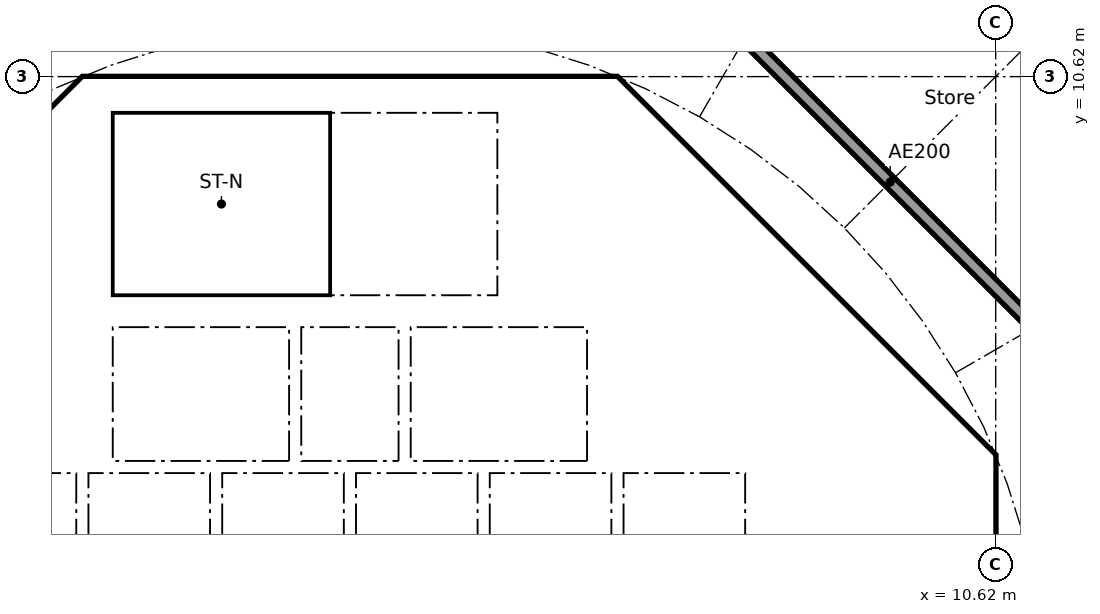
"""IFC4 building model, lengths in metres.
Left out: names, types, materials, properties, quantities, classifications, styles, units other than length and angle.
Written with IfcOpenShell. Run it as: python <this file> out.ifc"""

import sys

from ifc_helpers import new_model, si_unit, direction, frame, frame_2d, origin, place, context, subcontext, project, spatial, polyline, rectangle, outline, extrude, element, fill, save


model = new_model("IFC4")
c1 = context("Model", 3, precision=1e-05, world=origin(), true_north=direction((0.0, 1.0)))
c2 = subcontext(c1, "Body", "Model", "MODEL_VIEW")
j1 = project(units=[si_unit("LENGTHUNIT", "METRE"), si_unit("PLANEANGLEUNIT", "RADIAN")], contexts=[c1])
p1 = place(None, origin())
s1 = spatial("IfcSite", under=j1, at=p1, CompositionType="ELEMENT")
p2 = place(p1, origin())
s2 = spatial("IfcBuilding", under=s1, at=p2, CompositionType="ELEMENT")
p3 = place(p2, frame((0.0, 0.0, 130.7)))
s3 = spatial("IfcBuildingStorey", under=s2, at=p3, CompositionType="ELEMENT", Elevation=130.7)
p4 = place(p3, frame((9.988, 4.613, 0.0), z_axis=(0.0, 0.0, 1.0), x_axis=(-0.707106781187, 0.707106781187, 0.0)))
e1 = element("IfcWall", 1, at=p4, inside=s3, PredefinedType="SHEAR", context=c2, shape_type="SweptSolid", body=[
    extrude(rectangle(XDim=7.602, YDim=0.6, at=frame_2d((3.801, 0.0))), origin(), (0.0, 0.0, 1.0), 3.44),
])
p5 = place(p4, frame((3.201, 0.0, 0.0)))
e2 = element("IfcOpeningElement", 2, at=p5, cuts=e1, PredefinedType="OPENING", context=c2, shape_type="SweptSolid", body=[
    extrude(rectangle(XDim=1.2, YDim=2.1, at=frame_2d((0.6, 1.05))), frame((0.0, 0.31, 0.0), z_axis=(0.0, -1.0, 0.0), x_axis=(1.0, 0.0, 0.0)), (0.0, 0.0, 1.0), 0.62),
])
p6 = place(p3, frame((-4.613, 9.988, 0.0), z_axis=(0.0, 0.0, 1.0), x_axis=(-0.707106781187, -0.707106781187, 0.0)))
e3 = element("IfcWall", 3, at=p6, inside=s3, PredefinedType="SHEAR", context=c2, shape_type="SweptSolid", body=[
    extrude(rectangle(XDim=7.602, YDim=0.6, at=frame_2d((3.801, 0.0))), origin(), (0.0, 0.0, 1.0), 3.44),
])
p7 = place(p6, frame((0.351, 0.0, 0.0)))
e4 = element("IfcOpeningElement", 4, at=p7, cuts=e3, PredefinedType="OPENING", context=c2, shape_type="SweptSolid", body=[
    extrude(rectangle(XDim=1.1, YDim=2.1, at=frame_2d((0.55, 1.05))), frame((0.0, 0.31, 0.0), z_axis=(0.0, -1.0, 0.0), x_axis=(1.0, 0.0, 0.0)), (0.0, 0.0, 1.0), 0.62),
])
p8 = place(p3, frame((4.0, 4.3, 0.0), z_axis=(0.0, 0.0, 1.0), x_axis=(0.0, 1.0, 0.0)))
e5 = element("IfcWall", 5, at=p8, inside=s3, PredefinedType="SOLIDWALL", context=c2, shape_type="SweptSolid", body=[
    extrude(rectangle(XDim=2.2, YDim=0.2, at=frame_2d((1.1, 0.0))), origin(), (0.0, 0.0, 1.0), 3.44),
])
p9 = place(p8, frame((0.55, 0.0, 0.0)))
e6 = element("IfcOpeningElement", 6, at=p9, cuts=e5, PredefinedType="OPENING", context=c2, shape_type="SweptSolid", body=[
    extrude(rectangle(XDim=1.1, YDim=2.1, at=frame_2d((0.55, 1.05))), frame((0.0, 0.11, 0.0), z_axis=(0.0, -1.0, 0.0), x_axis=(1.0, 0.0, 0.0)), (0.0, 0.0, 1.0), 0.22),
])
p10 = place(p3, frame((-4.0, 4.3, 0.0), z_axis=(0.0, 0.0, 1.0), x_axis=(0.0, 1.0, 0.0)))
e7 = element("IfcWall", 7, at=p10, inside=s3, PredefinedType="SOLIDWALL", context=c2, shape_type="SweptSolid", body=[
    extrude(rectangle(XDim=2.2, YDim=0.2, at=frame_2d((1.1, 0.0))), origin(), (0.0, 0.0, 1.0), 3.44),
])
p11 = place(p10, frame((0.55, 0.0, 0.0)))
e8 = element("IfcOpeningElement", 8, at=p11, cuts=e7, PredefinedType="OPENING", context=c2, shape_type="SweptSolid", body=[
    extrude(rectangle(XDim=1.1, YDim=2.1, at=frame_2d((0.55, 1.05))), frame((0.0, 0.11, 0.0), z_axis=(0.0, -1.0, 0.0), x_axis=(1.0, 0.0, 0.0)), (0.0, 0.0, 1.0), 0.22),
])
p12 = place(p3, frame((6.7, 4.0, 0.0), z_axis=(0.0, 0.0, 1.0), x_axis=(1.0, 0.0, 0.0)))
e9 = element("IfcWall", 9, at=p12, inside=s3, PredefinedType="SOLIDWALL", context=c2, shape_type="SweptSolid", body=[
    extrude(rectangle(XDim=3.325, YDim=0.2, at=frame_2d((1.662, 0.0))), origin(), (0.0, 0.0, 1.0), 3.44),
])
p13 = place(p12, frame((1.25, 0.0, 0.0)))
e10 = element("IfcOpeningElement", 10, at=p13, cuts=e9, PredefinedType="OPENING", context=c2, shape_type="SweptSolid", body=[
    extrude(rectangle(XDim=1.1, YDim=2.1, at=frame_2d((0.55, 1.05))), frame((0.0, 0.11, 0.0), z_axis=(0.0, -1.0, 0.0), x_axis=(1.0, 0.0, 0.0)), (0.0, 0.0, 1.0), 0.22),
])
p14 = place(p3, frame((4.0, 7.025, 0.0), z_axis=(0.0, 0.0, 1.0), x_axis=(0.0, 1.0, 0.0)))
e11 = element("IfcWall", 11, at=p14, inside=s3, PredefinedType="SOLIDWALL", context=c2, shape_type="SweptSolid", body=[
    extrude(rectangle(XDim=3.0, YDim=0.2, at=frame_2d((1.5, 0.0))), origin(), (0.0, 0.0, 1.0), 3.44),
])
p15 = place(p14, frame((0.925, 0.0, 0.0)))
e12 = element("IfcOpeningElement", 12, at=p15, cuts=e11, PredefinedType="OPENING", context=c2, shape_type="SweptSolid", body=[
    extrude(rectangle(XDim=1.1, YDim=2.1, at=frame_2d((0.55, 1.05))), frame((0.0, 0.11, 0.0), z_axis=(0.0, -1.0, 0.0), x_axis=(1.0, 0.0, 0.0)), (0.0, 0.0, 1.0), 0.22),
])
p16 = place(p3, origin())
e13 = element("IfcWall", 13, at=p16, inside=s3, PredefinedType="SHEAR", context=c2, shape_type="SweptSolid", body=[
    extrude(outline(polyline([(-4.152, 10.025), (-4.401, 9.776), (-4.825, 10.2), (-4.401, 10.625), (4.401, 10.625), (4.825, 10.2), (4.401, 9.776), (4.152, 10.025), (-4.152, 10.025)])), origin(), (0.0, 0.0, 1.0), 3.44),
])
p17 = place(p3, origin())
e14 = element("IfcWall", 14, at=p17, inside=s3, PredefinedType="SHEAR", context=c2, shape_type="SweptSolid", body=[
    extrude(outline(polyline([(9.776, -4.401), (10.025, -4.152), (10.025, -3.801), (10.025, 4.152), (9.776, 4.401), (10.2, 4.825), (10.625, 4.401), (10.625, -4.401), (10.2, -4.825), (9.776, -4.401)])), origin(), (0.0, 0.0, 1.0), 3.44),
])
for number, where, z_axis, x_axis in (
    (15, (-0.9, 4.3, 0.0), (0.0, 0.0, 1.0), (0.0, 1.0, 0.0)),
    (16, (0.9, 4.3, 0.0), (0.0, 0.0, 1.0), (0.0, 1.0, 0.0)),
):
    element("IfcWall", number, at=place(p3, frame(where, z_axis=z_axis, x_axis=x_axis)), inside=s3, PredefinedType="SOLIDWALL", context=c2, shape_type="SweptSolid", body=[
        extrude(rectangle(XDim=2.2, YDim=0.2, at=frame_2d((1.1, 0.0))), origin(), (0.0, 0.0, 1.0), 3.44),
    ])
p18 = place(p3, origin())
e17 = element("IfcWall", 17, at=p18, inside=s3, PredefinedType="SOLIDWALL", context=c2, shape_type="SweptSolid", body=[
    extrude(outline(polyline([(-6.5, 2.1), (-6.7, 2.1), (-6.7, 4.3), (6.7, 4.3), (6.7, 2.1), (6.5, 2.1), (6.5, 4.1), (4.5, 4.1), (4.5, 2.1), (4.3, 2.1), (4.3, 4.1), (2.3, 4.1), (2.3, 2.1), (2.1, 2.1), (2.1, 4.1), (0.1, 4.1), (0.1, 2.1), (-0.1, 2.1), (-0.1, 4.1), (-2.1, 4.1), (-2.1, 2.1), (-2.3, 2.1), (-2.3, 4.1), (-4.3, 4.1), (-4.3, 2.1), (-4.5, 2.1), (-4.5, 4.1), (-6.5, 4.1), (-6.5, 2.1)])), origin(), (0.0, 0.0, 1.0), 3.44),
])
p19 = place(p3, origin())
e18 = element("IfcWall", 18, at=p19, inside=s3, PredefinedType="SOLIDWALL", context=c2, shape_type="SweptSolid", body=[
    extrude(outline(polyline([(-3.9, 7.025), (-4.1, 7.025), (-4.1, 10.025), (-3.9, 10.025), (-3.9, 7.025)])), origin(), (0.0, 0.0, 1.0), 3.44),
])
p20 = place(p3, origin())
e19 = element("IfcWall", 19, at=p20, inside=s3, PredefinedType="SOLIDWALL", context=c2, shape_type="SweptSolid", body=[
    extrude(outline(polyline([(4.1, 6.5), (-4.1, 6.5), (-4.1, 7.025), (4.1, 7.025), (4.1, 6.5)])), origin(), (0.0, 0.0, 1.0), 3.44),
])
p21 = place(p3, origin())
e20 = element("IfcWall", 20, at=p21, inside=s3, PredefinedType="SOLIDWALL", context=c2, shape_type="SweptSolid", body=[
    extrude(outline(polyline([(7.025, -3.9), (6.7, -3.9), (6.7, 3.9), (7.025, 3.9), (7.025, -3.9)])), origin(), (0.0, 0.0, 1.0), 3.44),
])
p22 = place(p3, frame((12.635, 5.134, 0.0), z_axis=(0.0, 0.0, 1.0), x_axis=(-0.707106781187, 0.707106781187, 0.0)))
e21 = element("IfcWall", 21, at=p22, inside=s3, PredefinedType="PARTITIONING", context=c2, shape_type="SweptSolid", body=[
    extrude(rectangle(XDim=10.609, YDim=0.2, at=frame_2d((5.305, 0.0))), origin(), (0.0, 0.0, 1.0), 3.44),
])
p23 = place(p3, frame((15.153, 6.597, 0.0), z_axis=(0.0, 0.0, 1.0), x_axis=(-0.647372160855, 0.762174051874, 0.0)))
e22 = element("IfcWall", 22, at=p23, inside=s3, PredefinedType="PARTITIONING", context=c2, shape_type="SweptSolid", body=[
    extrude(rectangle(XDim=6.363, YDim=0.1, at=frame_2d((3.181, 0.0))), origin(), (0.0, 0.0, 1.0), 2.828),
])
p24 = place(p9, origin())
e23 = element("IfcDoor", 23, at=p24, inside=s3, OperationType="DOUBLE_DOOR_SLIDING", PredefinedType="DOOR", context=c2, shape_type="SweptSolid", body=[
    extrude(rectangle(XDim=1.1, YDim=2.1, at=frame_2d((0.55, 1.05))), frame((0.0, 0.025, 0.0), z_axis=(0.0, -1.0, 0.0), x_axis=(1.0, 0.0, 0.0)), (0.0, 0.0, 1.0), 0.05),
])
fill(e6, e23)
p25 = place(p11, origin())
e24 = element("IfcDoor", 24, at=p25, inside=s3, OperationType="DOUBLE_DOOR_SLIDING", PredefinedType="DOOR", context=c2, shape_type="SweptSolid", body=[
    extrude(rectangle(XDim=1.1, YDim=2.1, at=frame_2d((0.55, 1.05))), frame((0.0, 0.025, 0.0), z_axis=(0.0, -1.0, 0.0), x_axis=(1.0, 0.0, 0.0)), (0.0, 0.0, 1.0), 0.05),
])
fill(e8, e24)
p26 = place(p13, frame((1.1, 0.0, 0.0), x_axis=(-1.0, 0.0, 0.0)))
e25 = element("IfcDoor", 25, at=p26, inside=s3, OperationType="SINGLE_SWING_RIGHT", PredefinedType="DOOR", context=c2, shape_type="SweptSolid", body=[
    extrude(rectangle(XDim=1.1, YDim=2.1, at=frame_2d((0.55, 1.05))), frame((0.0, 0.025, 0.0), z_axis=(0.0, -1.0, 0.0), x_axis=(1.0, 0.0, 0.0)), (0.0, 0.0, 1.0), 0.05),
])
fill(e10, e25)
p27 = place(p15, origin())
e26 = element("IfcDoor", 26, at=p27, inside=s3, OperationType="SINGLE_SWING_LEFT", PredefinedType="DOOR", context=c2, shape_type="SweptSolid", body=[
    extrude(rectangle(XDim=1.1, YDim=2.1, at=frame_2d((0.55, 1.05))), frame((0.0, 0.025, 0.0), z_axis=(0.0, -1.0, 0.0), x_axis=(1.0, 0.0, 0.0)), (0.0, 0.0, 1.0), 0.05),
])
fill(e12, e26)
p28 = place(p5, origin())
e27 = element("IfcDoor", 27, at=p28, inside=s3, OperationType="SINGLE_SWING_LEFT", PredefinedType="DOOR", context=c2, shape_type="SweptSolid", body=[
    extrude(rectangle(XDim=1.2, YDim=2.1, at=frame_2d((0.6, 1.05))), frame((0.0, 0.025, 0.0), z_axis=(0.0, -1.0, 0.0), x_axis=(1.0, 0.0, 0.0)), (0.0, 0.0, 1.0), 0.05),
])
fill(e2, e27)
p29 = place(p7, origin())
e28 = element("IfcDoor", 28, at=p29, inside=s3, OperationType="SINGLE_SWING_LEFT", PredefinedType="DOOR", context=c2, shape_type="SweptSolid", body=[
    extrude(rectangle(XDim=1.1, YDim=2.1, at=frame_2d((0.55, 1.05))), frame((0.0, 0.025, 0.0), z_axis=(0.0, -1.0, 0.0), x_axis=(1.0, 0.0, 0.0)), (0.0, 0.0, 1.0), 0.05),
])
fill(e4, e28)
save(model, sys.argv[1])
